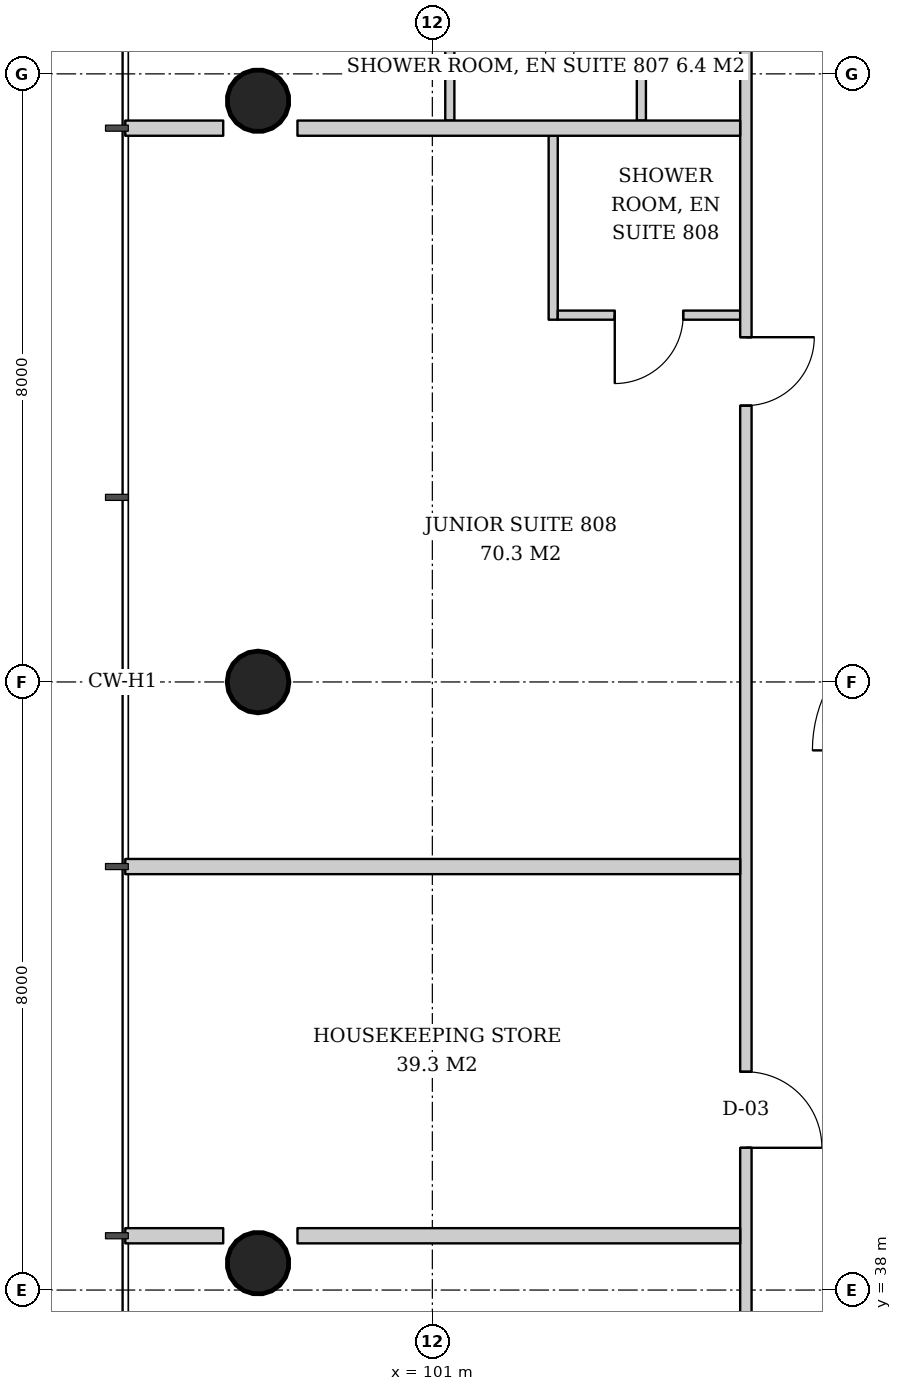
"""IFC4 building model, lengths in metres.
Left out: names, types, materials, properties, quantities, classifications, styles, units other than length and angle.
Written with IfcOpenShell. Run it as: python <this file> out.ifc"""

import sys

from ifc_helpers import new_model, si_unit, direction, frame, frame_2d, origin, origin_2d, place, context, subcontext, project, spatial, rectangle, hollow_circle, extrude, element, fill, save


model = new_model("IFC4")
c1 = context("Model", 3, precision=1e-05, world=origin(), true_north=direction((0.0, 1.0)))
c2 = subcontext(c1, "Body", "Model", "MODEL_VIEW")
j1 = project(units=[si_unit("LENGTHUNIT", "METRE"), si_unit("PLANEANGLEUNIT", "RADIAN")], contexts=[c1])
p1 = place(None, origin())
s1 = spatial("IfcSite", under=j1, at=p1, CompositionType="ELEMENT")
p2 = place(p1, origin())
s2 = spatial("IfcBuilding", under=s1, at=p2, CompositionType="ELEMENT")
p3 = place(p2, frame((0.0, 0.0, 36.2)))
s3 = spatial("IfcBuildingStorey", under=s2, at=p3, CompositionType="ELEMENT", Elevation=36.2)
p4 = place(p3, frame((98.655, 53.672, 0.0), z_axis=(0.042995531285, -0.021497765643, 0.998843946952), x_axis=(0.4472135955, 0.894427191, 0.0)))
e1 = element("IfcColumn", 1, at=p4, inside=s3, PredefinedType="COLUMN", context=c2, shape_type="SweptSolid", body=[
    extrude(hollow_circle(Radius=0.406, WallThickness=0.03, at=origin_2d()), origin(), (0.0, 0.0, 1.0), 3.804),
])
p5 = place(p3, frame((98.655, 46.0, 0.0), z_axis=(0.043005470007, 0.0, 0.999074836811), x_axis=(0.0, 1.0, 0.0)))
e2 = element("IfcColumn", 2, at=p5, inside=s3, PredefinedType="COLUMN", context=c2, shape_type="SweptSolid", body=[
    extrude(hollow_circle(Radius=0.406, WallThickness=0.03, at=origin_2d()), origin(), (0.0, 0.0, 1.0), 3.803),
])
p6 = place(p3, frame((98.655, 38.328, 0.0), z_axis=(0.042995531285, 0.021497765643, 0.998843946952), x_axis=(-0.4472135955, 0.894427191, 0.0)))
e3 = element("IfcColumn", 3, at=p6, inside=s3, PredefinedType="COLUMN", context=c2, shape_type="SweptSolid", body=[
    extrude(hollow_circle(Radius=0.406, WallThickness=0.03, at=origin_2d()), origin(), (0.0, 0.0, 1.0), 3.804),
])
p7 = place(p3, frame((103.75, 53.386, 0.0), z_axis=(0.0, 0.0, 1.0), x_axis=(0.0, 1.0, 0.0)))
e4 = element("IfcWall", 4, at=p7, inside=s3, PredefinedType="PARTITIONING", context=c2, shape_type="SweptSolid", body=[
    extrude(rectangle(XDim=2.58, YDim=0.12, at=frame_2d((1.29, 0.0))), origin(), (0.0, 0.0, 1.0), 2.8),
])
p8 = place(p7, frame((0.75, 0.0, 0.0)))
e5 = element("IfcOpeningElement", 5, at=p8, cuts=e4, PredefinedType="OPENING", context=c2, shape_type="SweptSolid", body=[
    extrude(rectangle(XDim=0.9, YDim=2.1, at=frame_2d((0.45, 1.05))), frame((0.0, 0.07, 0.0), z_axis=(0.0, -1.0, 0.0), x_axis=(1.0, 0.0, 0.0)), (0.0, 0.0, 1.0), 0.14),
])
p9 = place(p3, frame((101.23, 53.386, 0.0), z_axis=(0.0, 0.0, 1.0), x_axis=(0.0, 1.0, 0.0)))
e6 = element("IfcWall", 6, at=p9, inside=s3, PredefinedType="PARTITIONING", context=c2, shape_type="SweptSolid", body=[
    extrude(rectangle(XDim=2.58, YDim=0.12, at=frame_2d((1.29, 0.0))), origin(), (0.0, 0.0, 1.0), 2.8),
])
p10 = place(p3, frame((102.59, 53.186, 0.0), z_axis=(0.0, 0.0, 1.0), x_axis=(0.0, -1.0, 0.0)))
e7 = element("IfcWall", 7, at=p10, inside=s3, PredefinedType="PARTITIONING", context=c2, shape_type="SweptSolid", body=[
    extrude(rectangle(XDim=2.42, YDim=0.12, at=frame_2d((1.21, 0.0))), origin(), (0.0, 0.0, 1.0), 2.847),
])
p11 = place(p3, frame((105.05, 50.826, 0.0), z_axis=(0.0, 0.0, 1.0), x_axis=(-1.0, 0.0, 0.0)))
e8 = element("IfcWall", 8, at=p11, inside=s3, PredefinedType="PARTITIONING", context=c2, shape_type="SweptSolid", body=[
    extrude(rectangle(XDim=2.4, YDim=0.12, at=frame_2d((1.2, 0.0))), origin(), (0.0, 0.0, 1.0), 3.6),
])
p12 = place(p11, frame((0.75, 0.0, 0.0)))
e9 = element("IfcOpeningElement", 9, at=p12, cuts=e8, PredefinedType="OPENING", context=c2, shape_type="SweptSolid", body=[
    extrude(rectangle(XDim=0.9, YDim=2.1, at=frame_2d((0.45, 1.05))), frame((0.0, 0.07, 0.0), z_axis=(0.0, -1.0, 0.0), x_axis=(1.0, 0.0, 0.0)), (0.0, 0.0, 1.0), 0.14),
])
p13 = place(p3, frame((105.125, 57.95, 0.0), z_axis=(0.0, 0.0, 1.0), x_axis=(0.0, -1.0, 0.0)))
e10 = element("IfcWall", 10, at=p13, inside=s3, PredefinedType="PARTITIONING", context=c2, shape_type="SweptSolid", body=[
    extrude(rectangle(XDim=23.75, YDim=0.15, at=frame_2d((11.875, 0.0))), origin(), (0.0, 0.0, 1.0), 2.8),
])
p14 = place(p13, frame((1.907, 0.0, 0.0)))
e11 = element("IfcOpeningElement", 11, at=p14, cuts=e10, PredefinedType="OPENING", context=c2, shape_type="SweptSolid", body=[
    extrude(rectangle(XDim=0.9, YDim=2.1, at=frame_2d((0.45, 1.05))), frame((0.0, 0.085, 0.0), z_axis=(0.0, -1.0, 0.0), x_axis=(1.0, 0.0, 0.0)), (0.0, 0.0, 1.0), 0.17),
])
p15 = place(p13, frame((7.414, 0.0, 0.0)))
e12 = element("IfcOpeningElement", 12, at=p15, cuts=e10, PredefinedType="OPENING", context=c2, shape_type="SweptSolid", body=[
    extrude(rectangle(XDim=0.9, YDim=2.1, at=frame_2d((0.45, 1.05))), frame((0.0, 0.085, 0.0), z_axis=(0.0, -1.0, 0.0), x_axis=(1.0, 0.0, 0.0)), (0.0, 0.0, 1.0), 0.17),
])
p16 = place(p13, frame((17.079, 0.0, 0.0)))
e13 = element("IfcOpeningElement", 13, at=p16, cuts=e10, PredefinedType="OPENING", context=c2, shape_type="SweptSolid", body=[
    extrude(rectangle(XDim=1.0, YDim=2.1, at=frame_2d((0.5, 1.05))), frame((0.0, 0.085, 0.0), z_axis=(0.0, -1.0, 0.0), x_axis=(1.0, 0.0, 0.0)), (0.0, 0.0, 1.0), 0.17),
])
p17 = place(p3, frame((105.05, 53.286, 0.0), z_axis=(0.0, 0.0, 1.0), x_axis=(-1.0, 0.0, 0.0)))
e14 = element("IfcWall", 14, at=p17, inside=s3, PredefinedType="PARTITIONING", context=c2, shape_type="SweptSolid", body=[
    extrude(rectangle(XDim=5.824, YDim=0.2, at=frame_2d((2.912, 0.0))), origin(), (0.0, 0.0, 1.0), 3.6),
])
p18 = place(p3, frame((98.249, 53.286, 0.0), z_axis=(0.0, 0.0, 1.0), x_axis=(-1.0, 0.0, 0.0)))
e15 = element("IfcWall", 15, at=p18, inside=s3, PredefinedType="PARTITIONING", context=c2, shape_type="SweptSolid", body=[
    extrude(rectangle(XDim=1.289, YDim=0.2, at=frame_2d((0.645, 0.0))), origin(), (0.0, 0.0, 1.0), 3.6),
])
p19 = place(p3, frame((105.05, 43.572, 0.0), z_axis=(0.0, 0.0, 1.0), x_axis=(-1.0, 0.0, 0.0)))
e16 = element("IfcWall", 16, at=p19, inside=s3, PredefinedType="PARTITIONING", context=c2, shape_type="SweptSolid", body=[
    extrude(rectangle(XDim=8.09, YDim=0.2, at=frame_2d((4.045, 0.0))), origin(), (0.0, 0.0, 1.0), 2.847),
])
p20 = place(p3, frame((105.05, 38.714, 0.0), z_axis=(0.0, 0.0, 1.0), x_axis=(-1.0, 0.0, 0.0)))
e17 = element("IfcWall", 17, at=p20, inside=s3, PredefinedType="PARTITIONING", context=c2, shape_type="SweptSolid", body=[
    extrude(rectangle(XDim=5.824, YDim=0.2, at=frame_2d((2.912, 0.0))), origin(), (0.0, 0.0, 1.0), 3.6),
])
p21 = place(p3, frame((98.249, 38.714, 0.0), z_axis=(0.0, 0.0, 1.0), x_axis=(-1.0, 0.0, 0.0)))
e18 = element("IfcWall", 18, at=p21, inside=s3, PredefinedType="PARTITIONING", context=c2, shape_type="SweptSolid", body=[
    extrude(rectangle(XDim=1.289, YDim=0.2, at=frame_2d((0.645, 0.0))), origin(), (0.0, 0.0, 1.0), 3.6),
])
p22 = place(p8, origin())
e19 = element("IfcDoor", 19, at=p22, inside=s3, OperationType="SINGLE_SWING_LEFT", PredefinedType="DOOR", context=c2, shape_type="SweptSolid", body=[
    extrude(rectangle(XDim=0.9, YDim=2.1, at=frame_2d((0.45, 1.05))), frame((0.0, 0.025, 0.0), z_axis=(0.0, -1.0, 0.0), x_axis=(1.0, 0.0, 0.0)), (0.0, 0.0, 1.0), 0.05),
])
fill(e5, e19)
p23 = place(p12, origin())
e20 = element("IfcDoor", 20, at=p23, inside=s3, OperationType="SINGLE_SWING_RIGHT", PredefinedType="DOOR", context=c2, shape_type="SweptSolid", body=[
    extrude(rectangle(XDim=0.9, YDim=2.1, at=frame_2d((0.45, 1.05))), frame((0.0, 0.025, 0.0), z_axis=(0.0, -1.0, 0.0), x_axis=(1.0, 0.0, 0.0)), (0.0, 0.0, 1.0), 0.05),
])
fill(e9, e20)
p24 = place(p15, origin())
e21 = element("IfcDoor", 21, at=p24, inside=s3, OperationType="SINGLE_SWING_LEFT", PredefinedType="DOOR", context=c2, shape_type="SweptSolid", body=[
    extrude(rectangle(XDim=0.9, YDim=2.1, at=frame_2d((0.45, 1.05))), frame((0.0, 0.025, 0.0), z_axis=(0.0, -1.0, 0.0), x_axis=(1.0, 0.0, 0.0)), (0.0, 0.0, 1.0), 0.05),
])
fill(e12, e21)
p25 = place(p16, origin())
e22 = element("IfcDoor", 22, at=p25, inside=s3, OperationType="SINGLE_SWING_RIGHT", PredefinedType="DOOR", context=c2, shape_type="SweptSolid", body=[
    extrude(rectangle(XDim=1.0, YDim=2.1, at=frame_2d((0.5, 1.05))), frame((0.0, 0.025, 0.0), z_axis=(0.0, -1.0, 0.0), x_axis=(1.0, 0.0, 0.0)), (0.0, 0.0, 1.0), 0.05),
])
fill(e13, e22)
save(model, sys.argv[1])
